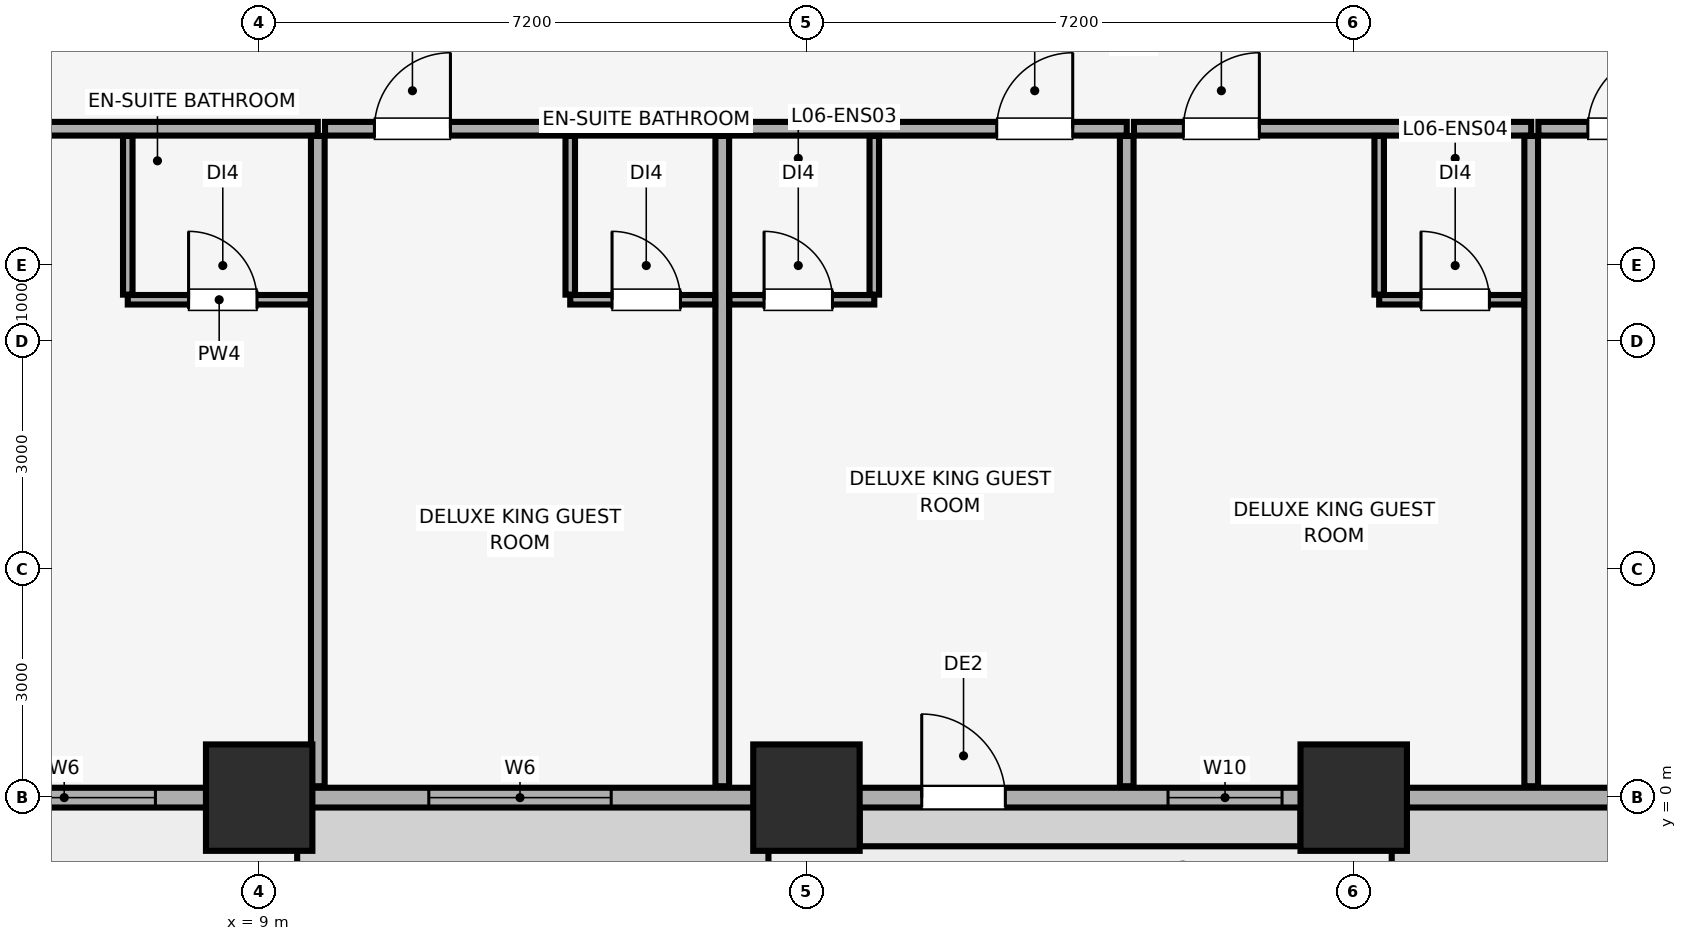
"""IFC4 building model, lengths in metres.
Left out: names, types, materials, properties, quantities, classifications, styles, units other than length and angle.
Written with IfcOpenShell. Run it as: python <this file> out.ifc"""

import sys

from ifc_helpers import new_model, si_unit, direction, frame, frame_2d, origin, origin_2d, place, context, subcontext, project, spatial, rectangle, extrude, element, fill, save


model = new_model("IFC4")
c1 = context("Model", 3, precision=1e-05, world=origin(), true_north=direction((0.0, 1.0)))
c2 = subcontext(c1, "Body", "Model", "MODEL_VIEW")
j1 = project(units=[si_unit("LENGTHUNIT", "METRE"), si_unit("PLANEANGLEUNIT", "RADIAN")], contexts=[c1])
p1 = place(None, origin())
s1 = spatial("IfcSite", under=j1, at=p1, CompositionType="ELEMENT")
p2 = place(p1, origin())
s2 = spatial("IfcBuilding", under=s1, at=p2, CompositionType="ELEMENT")
p3 = place(p2, frame((0.0, 0.0, 35.15)))
s3 = spatial("IfcBuildingStorey", under=s2, at=p3, CompositionType="ELEMENT", Elevation=35.15)
for number, where, z_axis, x_axis in (
    (1, (9.0, 0.0, 0.0), (0.0, 0.0, 1.0), (1.0, 0.0, 0.0)),
    (2, (16.2, 0.0, 0.0), (0.0, 0.0, 1.0), (1.0, 0.0, 0.0)),
    (3, (23.4, 0.0, 0.0), (0.0, 0.0, 1.0), (1.0, 0.0, 0.0)),
):
    element("IfcColumn", number, at=place(p3, frame(where, z_axis=z_axis, x_axis=x_axis)), inside=s3, PredefinedType="COLUMN", context=c2, shape_type="SweptSolid", body=[
        extrude(rectangle(XDim=1.4, YDim=1.4, at=origin_2d()), origin(), (0.0, 0.0, 1.0), 3.51),
    ])
p4 = place(p3, frame((4.2, 0.0, 0.0), z_axis=(0.0, 0.0, 1.0), x_axis=(1.0, 0.0, 0.0)))
e4 = element("IfcWall", 4, at=p4, inside=s3, PredefinedType="SOLIDWALL", context=c2, shape_type="SweptSolid", body=[
    extrude(rectangle(XDim=75.6, YDim=0.26, at=frame_2d((37.8, 0.0))), origin(), (0.0, 0.0, 1.0), 2.56),
])
p5 = place(p4, frame((13.517, 0.0, 0.0)))
e5 = element("IfcOpeningElement", 5, at=p5, cuts=e4, PredefinedType="OPENING", context=c2, shape_type="SweptSolid", body=[
    extrude(rectangle(XDim=1.1, YDim=2.15, at=frame_2d((0.55, 1.075))), frame((0.0, 0.14, 0.0), z_axis=(0.0, -1.0, 0.0), x_axis=(1.0, 0.0, 0.0)), (0.0, 0.0, 1.0), 0.28),
])
p6 = place(p4, frame((28.183, 0.0, 0.0)))
e6 = element("IfcOpeningElement", 6, at=p6, cuts=e4, PredefinedType="OPENING", context=c2, shape_type="SweptSolid", body=[
    extrude(rectangle(XDim=1.1, YDim=2.15, at=frame_2d((0.55, 1.075))), frame((0.0, 0.14, 0.0), z_axis=(0.0, -1.0, 0.0), x_axis=(1.0, 0.0, 0.0)), (0.0, 0.0, 1.0), 0.28),
])
p7 = place(p4, frame((60.983, 0.0, 0.0)))
e7 = element("IfcOpeningElement", 7, at=p7, cuts=e4, PredefinedType="OPENING", context=c2, shape_type="SweptSolid", body=[
    extrude(rectangle(XDim=1.1, YDim=2.15, at=frame_2d((0.55, 1.075))), frame((0.0, 0.14, 0.0), z_axis=(0.0, -1.0, 0.0), x_axis=(1.0, 0.0, 0.0)), (0.0, 0.0, 1.0), 0.28),
])
p8 = place(p4, frame((1.035, 0.0, 0.85)))
e8 = element("IfcOpeningElement", 8, at=p8, cuts=e4, PredefinedType="OPENING", context=c2, shape_type="SweptSolid", body=[
    extrude(rectangle(XDim=2.4, YDim=1.5, at=frame_2d((1.2, 0.75))), frame((0.0, 0.14, 0.0), z_axis=(0.0, -1.0, 0.0), x_axis=(1.0, 0.0, 0.0)), (0.0, 0.0, 1.0), 0.28),
])
p9 = place(p4, frame((7.031, 0.0, 0.85)))
e9 = element("IfcOpeningElement", 9, at=p9, cuts=e4, PredefinedType="OPENING", context=c2, shape_type="SweptSolid", body=[
    extrude(rectangle(XDim=2.4, YDim=1.5, at=frame_2d((1.2, 0.75))), frame((0.0, 0.14, 0.0), z_axis=(0.0, -1.0, 0.0), x_axis=(1.0, 0.0, 0.0)), (0.0, 0.0, 1.0), 0.28),
])
p10 = place(p4, frame((16.757, 0.0, 0.85)))
e10 = element("IfcOpeningElement", 10, at=p10, cuts=e4, PredefinedType="OPENING", context=c2, shape_type="SweptSolid", body=[
    extrude(rectangle(XDim=1.5, YDim=1.4, at=frame_2d((0.75, 0.7))), frame((0.0, 0.14, 0.0), z_axis=(0.0, -1.0, 0.0), x_axis=(1.0, 0.0, 0.0)), (0.0, 0.0, 1.0), 0.28),
])
p11 = place(p4, frame((22.567, 0.0, 0.85)))
e11 = element("IfcOpeningElement", 11, at=p11, cuts=e4, PredefinedType="OPENING", context=c2, shape_type="SweptSolid", body=[
    extrude(rectangle(XDim=2.4, YDim=1.5, at=frame_2d((1.2, 0.75))), frame((0.0, 0.14, 0.0), z_axis=(0.0, -1.0, 0.0), x_axis=(1.0, 0.0, 0.0)), (0.0, 0.0, 1.0), 0.28),
])
p12 = place(p4, frame((30.065, 0.0, 0.85)))
e12 = element("IfcOpeningElement", 12, at=p12, cuts=e4, PredefinedType="OPENING", context=c2, shape_type="SweptSolid", body=[
    extrude(rectangle(XDim=1.5, YDim=1.4, at=frame_2d((0.75, 0.7))), frame((0.0, 0.14, 0.0), z_axis=(0.0, -1.0, 0.0), x_axis=(1.0, 0.0, 0.0)), (0.0, 0.0, 1.0), 0.28),
])
p13 = place(p4, frame((34.55, 0.0, 0.85)))
e13 = element("IfcOpeningElement", 13, at=p13, cuts=e4, PredefinedType="OPENING", context=c2, shape_type="SweptSolid", body=[
    extrude(rectangle(XDim=2.4, YDim=1.5, at=frame_2d((1.2, 0.75))), frame((0.0, 0.14, 0.0), z_axis=(0.0, -1.0, 0.0), x_axis=(1.0, 0.0, 0.0)), (0.0, 0.0, 1.0), 0.28),
])
p14 = place(p4, frame((38.35, 0.0, 0.85)))
e14 = element("IfcOpeningElement", 14, at=p14, cuts=e4, PredefinedType="OPENING", context=c2, shape_type="SweptSolid", body=[
    extrude(rectangle(XDim=2.4, YDim=1.5, at=frame_2d((1.2, 0.75))), frame((0.0, 0.14, 0.0), z_axis=(0.0, -1.0, 0.0), x_axis=(1.0, 0.0, 0.0)), (0.0, 0.0, 1.0), 0.28),
])
p15 = place(p4, frame((44.281, 0.0, 0.85)))
e15 = element("IfcOpeningElement", 15, at=p15, cuts=e4, PredefinedType="OPENING", context=c2, shape_type="SweptSolid", body=[
    extrude(rectangle(XDim=2.4, YDim=1.5, at=frame_2d((1.2, 0.75))), frame((0.0, 0.14, 0.0), z_axis=(0.0, -1.0, 0.0), x_axis=(1.0, 0.0, 0.0)), (0.0, 0.0, 1.0), 0.28),
])
p16 = place(p4, frame((50.332, 0.0, 0.85)))
e16 = element("IfcOpeningElement", 16, at=p16, cuts=e4, PredefinedType="OPENING", context=c2, shape_type="SweptSolid", body=[
    extrude(rectangle(XDim=2.4, YDim=1.5, at=frame_2d((1.2, 0.75))), frame((0.0, 0.14, 0.0), z_axis=(0.0, -1.0, 0.0), x_axis=(1.0, 0.0, 0.0)), (0.0, 0.0, 1.0), 0.28),
])
p17 = place(p4, frame((53.981, 0.0, 0.85)))
e17 = element("IfcOpeningElement", 17, at=p17, cuts=e4, PredefinedType="OPENING", context=c2, shape_type="SweptSolid", body=[
    extrude(rectangle(XDim=1.5, YDim=1.4, at=frame_2d((0.75, 0.7))), frame((0.0, 0.14, 0.0), z_axis=(0.0, -1.0, 0.0), x_axis=(1.0, 0.0, 0.0)), (0.0, 0.0, 1.0), 0.28),
])
p18 = place(p4, frame((64.759, 0.0, 0.85)))
e18 = element("IfcOpeningElement", 18, at=p18, cuts=e4, PredefinedType="OPENING", context=c2, shape_type="SweptSolid", body=[
    extrude(rectangle(XDim=1.5, YDim=1.4, at=frame_2d((0.75, 0.7))), frame((0.0, 0.14, 0.0), z_axis=(0.0, -1.0, 0.0), x_axis=(1.0, 0.0, 0.0)), (0.0, 0.0, 1.0), 0.28),
])
p19 = place(p4, frame((67.509, 0.0, 0.85)))
e19 = element("IfcOpeningElement", 19, at=p19, cuts=e4, PredefinedType="OPENING", context=c2, shape_type="SweptSolid", body=[
    extrude(rectangle(XDim=2.4, YDim=1.5, at=frame_2d((1.2, 0.75))), frame((0.0, 0.14, 0.0), z_axis=(0.0, -1.0, 0.0), x_axis=(1.0, 0.0, 0.0)), (0.0, 0.0, 1.0), 0.28),
])
p20 = place(p4, frame((72.165, 0.0, 0.85)))
e20 = element("IfcOpeningElement", 20, at=p20, cuts=e4, PredefinedType="OPENING", context=c2, shape_type="SweptSolid", body=[
    extrude(rectangle(XDim=2.4, YDim=1.5, at=frame_2d((1.2, 0.75))), frame((0.0, 0.14, 0.0), z_axis=(0.0, -1.0, 0.0), x_axis=(1.0, 0.0, 0.0)), (0.0, 0.0, 1.0), 0.28),
])
p21 = place(p3, frame((0.15, 8.8, 0.0), z_axis=(0.0, 0.0, 1.0), x_axis=(1.0, 0.0, 0.0)))
e21 = element("IfcWall", 21, at=p21, inside=s3, PredefinedType="PARTITIONING", context=c2, shape_type="SweptSolid", body=[
    extrude(rectangle(XDim=9.621, YDim=0.18, at=frame_2d((4.811, 0.0))), origin(), (0.0, 0.0, 1.0), 3.51),
])
p22 = place(p21, frame((4.95, 0.0, 0.0)))
e22 = element("IfcOpeningElement", 22, at=p22, cuts=e21, PredefinedType="OPENING", context=c2, shape_type="SweptSolid", body=[
    extrude(rectangle(XDim=1.0, YDim=2.15, at=frame_2d((0.5, 1.075))), frame((0.0, 0.1, 0.0), z_axis=(0.0, -1.0, 0.0), x_axis=(1.0, 0.0, 0.0)), (0.0, 0.0, 1.0), 0.2),
])
p23 = place(p3, frame((9.771, 0.15, 0.0), z_axis=(0.0, 0.0, 1.0), x_axis=(0.0, 1.0, 0.0)))
e23 = element("IfcWall", 23, at=p23, inside=s3, PredefinedType="PARTITIONING", context=c2, shape_type="SweptSolid", body=[
    extrude(rectangle(XDim=8.555, YDim=0.18, at=frame_2d((4.278, 0.0))), origin(), (0.0, 0.0, 1.0), 3.51),
])
p24 = place(p3, frame((7.271, 6.55, 0.0), z_axis=(0.0, 0.0, 1.0), x_axis=(1.0, 0.0, 0.0)))
e24 = element("IfcWall", 24, at=p24, inside=s3, PredefinedType="PARTITIONING", context=c2, shape_type="SweptSolid", body=[
    extrude(rectangle(XDim=2.405, YDim=0.125, at=frame_2d((1.203, 0.0))), origin(), (0.0, 0.0, 1.0), 3.51),
])
p25 = place(p24, frame((0.8, 0.0, 0.0)))
e25 = element("IfcOpeningElement", 25, at=p25, cuts=e24, PredefinedType="OPENING", context=c2, shape_type="SweptSolid", body=[
    extrude(rectangle(XDim=0.9, YDim=2.1, at=frame_2d((0.45, 1.05))), frame((0.0, 0.073, 0.0), z_axis=(0.0, -1.0, 0.0), x_axis=(1.0, 0.0, 0.0)), (0.0, 0.0, 1.0), 0.145),
])
p26 = place(p3, frame((7.271, 6.617, 0.0), z_axis=(0.0, 0.0, 1.0), x_axis=(0.0, 1.0, 0.0)))
e26 = element("IfcWall", 26, at=p26, inside=s3, PredefinedType="PARTITIONING", context=c2, shape_type="SweptSolid", body=[
    extrude(rectangle(XDim=2.088, YDim=0.125, at=frame_2d((1.044, 0.0))), origin(), (0.0, 0.0, 1.0), 3.51),
])
p27 = place(p3, frame((9.866, 8.8, 0.0), z_axis=(0.0, 0.0, 1.0), x_axis=(1.0, 0.0, 0.0)))
e27 = element("IfcWall", 27, at=p27, inside=s3, PredefinedType="PARTITIONING", context=c2, shape_type="SweptSolid", body=[
    extrude(rectangle(XDim=5.226, YDim=0.18, at=frame_2d((2.613, 0.0))), origin(), (0.0, 0.0, 1.0), 3.51),
])
p28 = place(p27, frame((0.65, 0.0, 0.0)))
e28 = element("IfcOpeningElement", 28, at=p28, cuts=e27, PredefinedType="OPENING", context=c2, shape_type="SweptSolid", body=[
    extrude(rectangle(XDim=1.0, YDim=2.15, at=frame_2d((0.5, 1.075))), frame((0.0, 0.1, 0.0), z_axis=(0.0, -1.0, 0.0), x_axis=(1.0, 0.0, 0.0)), (0.0, 0.0, 1.0), 0.2),
])
p29 = place(p3, frame((15.093, 0.15, 0.0), z_axis=(0.0, 0.0, 1.0), x_axis=(0.0, 1.0, 0.0)))
e29 = element("IfcWall", 29, at=p29, inside=s3, PredefinedType="PARTITIONING", context=c2, shape_type="SweptSolid", body=[
    extrude(rectangle(XDim=8.555, YDim=0.18, at=frame_2d((4.278, 0.0))), origin(), (0.0, 0.0, 1.0), 3.51),
])
p30 = place(p3, frame((13.093, 6.55, 0.0), z_axis=(0.0, 0.0, 1.0), x_axis=(1.0, 0.0, 0.0)))
e30 = element("IfcWall", 30, at=p30, inside=s3, PredefinedType="PARTITIONING", context=c2, shape_type="SweptSolid", body=[
    extrude(rectangle(XDim=1.905, YDim=0.125, at=frame_2d((0.953, 0.0))), origin(), (0.0, 0.0, 1.0), 3.51),
])
p31 = place(p30, frame((0.55, 0.0, 0.0)))
e31 = element("IfcOpeningElement", 31, at=p31, cuts=e30, PredefinedType="OPENING", context=c2, shape_type="SweptSolid", body=[
    extrude(rectangle(XDim=0.9, YDim=2.1, at=frame_2d((0.45, 1.05))), frame((0.0, 0.073, 0.0), z_axis=(0.0, -1.0, 0.0), x_axis=(1.0, 0.0, 0.0)), (0.0, 0.0, 1.0), 0.145),
])
p32 = place(p3, frame((13.093, 6.617, 0.0), z_axis=(0.0, 0.0, 1.0), x_axis=(0.0, 1.0, 0.0)))
e32 = element("IfcWall", 32, at=p32, inside=s3, PredefinedType="PARTITIONING", context=c2, shape_type="SweptSolid", body=[
    extrude(rectangle(XDim=2.088, YDim=0.125, at=frame_2d((1.044, 0.0))), origin(), (0.0, 0.0, 1.0), 3.51),
])
p33 = place(p3, frame((15.188, 8.8, 0.0), z_axis=(0.0, 0.0, 1.0), x_axis=(1.0, 0.0, 0.0)))
e33 = element("IfcWall", 33, at=p33, inside=s3, PredefinedType="PARTITIONING", context=c2, shape_type="SweptSolid", body=[
    extrude(rectangle(XDim=5.226, YDim=0.18, at=frame_2d((2.613, 0.0))), origin(), (0.0, 0.0, 1.0), 3.51),
])
p34 = place(p33, frame((3.516, 0.0, 0.0)))
e34 = element("IfcOpeningElement", 34, at=p34, cuts=e33, PredefinedType="OPENING", context=c2, shape_type="SweptSolid", body=[
    extrude(rectangle(XDim=1.0, YDim=2.15, at=frame_2d((0.5, 1.075))), frame((0.0, 0.1, 0.0), z_axis=(0.0, -1.0, 0.0), x_axis=(1.0, 0.0, 0.0)), (0.0, 0.0, 1.0), 0.2),
])
p35 = place(p3, frame((20.414, 0.15, 0.0), z_axis=(0.0, 0.0, 1.0), x_axis=(0.0, 1.0, 0.0)))
e35 = element("IfcWall", 35, at=p35, inside=s3, PredefinedType="PARTITIONING", context=c2, shape_type="SweptSolid", body=[
    extrude(rectangle(XDim=8.555, YDim=0.18, at=frame_2d((4.278, 0.0))), origin(), (0.0, 0.0, 1.0), 3.51),
])
p36 = place(p3, frame((15.188, 6.55, 0.0), z_axis=(0.0, 0.0, 1.0), x_axis=(1.0, 0.0, 0.0)))
e36 = element("IfcWall", 36, at=p36, inside=s3, PredefinedType="PARTITIONING", context=c2, shape_type="SweptSolid", body=[
    extrude(rectangle(XDim=1.905, YDim=0.125, at=frame_2d((0.953, 0.0))), origin(), (0.0, 0.0, 1.0), 3.51),
])
p37 = place(p36, frame((0.455, 0.0, 0.0)))
e37 = element("IfcOpeningElement", 37, at=p37, cuts=e36, PredefinedType="OPENING", context=c2, shape_type="SweptSolid", body=[
    extrude(rectangle(XDim=0.9, YDim=2.1, at=frame_2d((0.45, 1.05))), frame((0.0, 0.073, 0.0), z_axis=(0.0, -1.0, 0.0), x_axis=(1.0, 0.0, 0.0)), (0.0, 0.0, 1.0), 0.145),
])
p38 = place(p3, frame((17.093, 6.617, 0.0), z_axis=(0.0, 0.0, 1.0), x_axis=(0.0, 1.0, 0.0)))
e38 = element("IfcWall", 38, at=p38, inside=s3, PredefinedType="PARTITIONING", context=c2, shape_type="SweptSolid", body=[
    extrude(rectangle(XDim=2.088, YDim=0.125, at=frame_2d((1.044, 0.0))), origin(), (0.0, 0.0, 1.0), 3.51),
])
p39 = place(p3, frame((20.509, 8.8, 0.0), z_axis=(0.0, 0.0, 1.0), x_axis=(1.0, 0.0, 0.0)))
e39 = element("IfcWall", 39, at=p39, inside=s3, PredefinedType="PARTITIONING", context=c2, shape_type="SweptSolid", body=[
    extrude(rectangle(XDim=5.226, YDim=0.18, at=frame_2d((2.613, 0.0))), origin(), (0.0, 0.0, 1.0), 3.51),
])
p40 = place(p39, frame((0.65, 0.0, 0.0)))
e40 = element("IfcOpeningElement", 40, at=p40, cuts=e39, PredefinedType="OPENING", context=c2, shape_type="SweptSolid", body=[
    extrude(rectangle(XDim=1.0, YDim=2.15, at=frame_2d((0.5, 1.075))), frame((0.0, 0.1, 0.0), z_axis=(0.0, -1.0, 0.0), x_axis=(1.0, 0.0, 0.0)), (0.0, 0.0, 1.0), 0.2),
])
p41 = place(p3, frame((25.735, 0.15, 0.0), z_axis=(0.0, 0.0, 1.0), x_axis=(0.0, 1.0, 0.0)))
e41 = element("IfcWall", 41, at=p41, inside=s3, PredefinedType="PARTITIONING", context=c2, shape_type="SweptSolid", body=[
    extrude(rectangle(XDim=8.555, YDim=0.18, at=frame_2d((4.278, 0.0))), origin(), (0.0, 0.0, 1.0), 3.51),
])
p42 = place(p3, frame((23.735, 6.55, 0.0), z_axis=(0.0, 0.0, 1.0), x_axis=(1.0, 0.0, 0.0)))
e42 = element("IfcWall", 42, at=p42, inside=s3, PredefinedType="PARTITIONING", context=c2, shape_type="SweptSolid", body=[
    extrude(rectangle(XDim=1.905, YDim=0.125, at=frame_2d((0.952, 0.0))), origin(), (0.0, 0.0, 1.0), 3.51),
])
p43 = place(p42, frame((0.55, 0.0, 0.0)))
e43 = element("IfcOpeningElement", 43, at=p43, cuts=e42, PredefinedType="OPENING", context=c2, shape_type="SweptSolid", body=[
    extrude(rectangle(XDim=0.9, YDim=2.1, at=frame_2d((0.45, 1.05))), frame((0.0, 0.073, 0.0), z_axis=(0.0, -1.0, 0.0), x_axis=(1.0, 0.0, 0.0)), (0.0, 0.0, 1.0), 0.145),
])
p44 = place(p3, frame((23.735, 6.617, 0.0), z_axis=(0.0, 0.0, 1.0), x_axis=(0.0, 1.0, 0.0)))
e44 = element("IfcWall", 44, at=p44, inside=s3, PredefinedType="PARTITIONING", context=c2, shape_type="SweptSolid", body=[
    extrude(rectangle(XDim=2.088, YDim=0.125, at=frame_2d((1.044, 0.0))), origin(), (0.0, 0.0, 1.0), 3.51),
])
p45 = place(p3, frame((25.83, 8.8, 0.0), z_axis=(0.0, 0.0, 1.0), x_axis=(1.0, 0.0, 0.0)))
e45 = element("IfcWall", 45, at=p45, inside=s3, PredefinedType="PARTITIONING", context=c2, shape_type="SweptSolid", body=[
    extrude(rectangle(XDim=5.226, YDim=0.18, at=frame_2d((2.613, 0.0))), origin(), (0.0, 0.0, 1.0), 3.51),
])
p46 = place(p45, frame((0.65, 0.0, 0.0)))
e46 = element("IfcOpeningElement", 46, at=p46, cuts=e45, PredefinedType="OPENING", context=c2, shape_type="SweptSolid", body=[
    extrude(rectangle(XDim=1.0, YDim=2.15, at=frame_2d((0.5, 1.075))), frame((0.0, 0.1, 0.0), z_axis=(0.0, -1.0, 0.0), x_axis=(1.0, 0.0, 0.0)), (0.0, 0.0, 1.0), 0.2),
])
p47 = place(p5, origin())
e47 = element("IfcDoor", 47, at=p47, inside=s3, OperationType="SINGLE_SWING_LEFT", PredefinedType="DOOR", context=c2, shape_type="SweptSolid", body=[
    extrude(rectangle(XDim=1.1, YDim=2.15, at=frame_2d((0.55, 1.075))), frame((0.0, 0.025, 0.0), z_axis=(0.0, -1.0, 0.0), x_axis=(1.0, 0.0, 0.0)), (0.0, 0.0, 1.0), 0.05),
])
fill(e5, e47)
p48 = place(p8, origin())
e48 = element("IfcWindow", 48, at=p48, inside=s3, PartitioningType="SINGLE_PANEL", PredefinedType="WINDOW", context=c2, shape_type="SweptSolid", body=[
    extrude(rectangle(XDim=2.4, YDim=1.5, at=frame_2d((1.2, 0.75))), frame((0.0, 0.03, 0.0), z_axis=(0.0, -1.0, 0.0), x_axis=(1.0, 0.0, 0.0)), (0.0, 0.0, 1.0), 0.06),
])
fill(e8, e48)
p49 = place(p9, origin())
e49 = element("IfcWindow", 49, at=p49, inside=s3, PartitioningType="SINGLE_PANEL", PredefinedType="WINDOW", context=c2, shape_type="SweptSolid", body=[
    extrude(rectangle(XDim=2.4, YDim=1.5, at=frame_2d((1.2, 0.75))), frame((0.0, 0.03, 0.0), z_axis=(0.0, -1.0, 0.0), x_axis=(1.0, 0.0, 0.0)), (0.0, 0.0, 1.0), 0.06),
])
fill(e9, e49)
p50 = place(p10, origin())
e50 = element("IfcWindow", 50, at=p50, inside=s3, PartitioningType="SINGLE_PANEL", PredefinedType="WINDOW", context=c2, shape_type="SweptSolid", body=[
    extrude(rectangle(XDim=1.5, YDim=1.4, at=frame_2d((0.75, 0.7))), frame((0.0, 0.03, 0.0), z_axis=(0.0, -1.0, 0.0), x_axis=(1.0, 0.0, 0.0)), (0.0, 0.0, 1.0), 0.06),
])
fill(e10, e50)
p51 = place(p25, origin())
e51 = element("IfcDoor", 51, at=p51, inside=s3, OperationType="SINGLE_SWING_LEFT", PredefinedType="DOOR", context=c2, shape_type="SweptSolid", body=[
    extrude(rectangle(XDim=0.9, YDim=2.1, at=frame_2d((0.45, 1.05))), frame((0.0, 0.025, 0.0), z_axis=(0.0, -1.0, 0.0), x_axis=(1.0, 0.0, 0.0)), (0.0, 0.0, 1.0), 0.05),
])
fill(e25, e51)
p52 = place(p28, origin())
e52 = element("IfcDoor", 52, at=p52, inside=s3, OperationType="SINGLE_SWING_RIGHT", PredefinedType="DOOR", context=c2, shape_type="SweptSolid", body=[
    extrude(rectangle(XDim=1.0, YDim=2.15, at=frame_2d((0.5, 1.075))), frame((0.0, 0.025, 0.0), z_axis=(0.0, -1.0, 0.0), x_axis=(1.0, 0.0, 0.0)), (0.0, 0.0, 1.0), 0.05),
])
fill(e28, e52)
p53 = place(p31, origin())
e53 = element("IfcDoor", 53, at=p53, inside=s3, OperationType="SINGLE_SWING_LEFT", PredefinedType="DOOR", context=c2, shape_type="SweptSolid", body=[
    extrude(rectangle(XDim=0.9, YDim=2.1, at=frame_2d((0.45, 1.05))), frame((0.0, 0.025, 0.0), z_axis=(0.0, -1.0, 0.0), x_axis=(1.0, 0.0, 0.0)), (0.0, 0.0, 1.0), 0.05),
])
fill(e31, e53)
p54 = place(p34, origin())
e54 = element("IfcDoor", 54, at=p54, inside=s3, OperationType="SINGLE_SWING_RIGHT", PredefinedType="DOOR", context=c2, shape_type="SweptSolid", body=[
    extrude(rectangle(XDim=1.0, YDim=2.15, at=frame_2d((0.5, 1.075))), frame((0.0, 0.025, 0.0), z_axis=(0.0, -1.0, 0.0), x_axis=(1.0, 0.0, 0.0)), (0.0, 0.0, 1.0), 0.05),
])
fill(e34, e54)
p55 = place(p37, origin())
e55 = element("IfcDoor", 55, at=p55, inside=s3, OperationType="SINGLE_SWING_LEFT", PredefinedType="DOOR", context=c2, shape_type="SweptSolid", body=[
    extrude(rectangle(XDim=0.9, YDim=2.1, at=frame_2d((0.45, 1.05))), frame((0.0, 0.025, 0.0), z_axis=(0.0, -1.0, 0.0), x_axis=(1.0, 0.0, 0.0)), (0.0, 0.0, 1.0), 0.05),
])
fill(e37, e55)
p56 = place(p40, origin())
e56 = element("IfcDoor", 56, at=p56, inside=s3, OperationType="SINGLE_SWING_RIGHT", PredefinedType="DOOR", context=c2, shape_type="SweptSolid", body=[
    extrude(rectangle(XDim=1.0, YDim=2.15, at=frame_2d((0.5, 1.075))), frame((0.0, 0.025, 0.0), z_axis=(0.0, -1.0, 0.0), x_axis=(1.0, 0.0, 0.0)), (0.0, 0.0, 1.0), 0.05),
])
fill(e40, e56)
p57 = place(p43, origin())
e57 = element("IfcDoor", 57, at=p57, inside=s3, OperationType="SINGLE_SWING_LEFT", PredefinedType="DOOR", context=c2, shape_type="SweptSolid", body=[
    extrude(rectangle(XDim=0.9, YDim=2.1, at=frame_2d((0.45, 1.05))), frame((0.0, 0.025, 0.0), z_axis=(0.0, -1.0, 0.0), x_axis=(1.0, 0.0, 0.0)), (0.0, 0.0, 1.0), 0.05),
])
fill(e43, e57)
p58 = place(p46, origin())
e58 = element("IfcDoor", 58, at=p58, inside=s3, OperationType="SINGLE_SWING_RIGHT", PredefinedType="DOOR", context=c2, shape_type="SweptSolid", body=[
    extrude(rectangle(XDim=1.0, YDim=2.15, at=frame_2d((0.5, 1.075))), frame((0.0, 0.025, 0.0), z_axis=(0.0, -1.0, 0.0), x_axis=(1.0, 0.0, 0.0)), (0.0, 0.0, 1.0), 0.05),
])
fill(e46, e58)
save(model, sys.argv[1])
